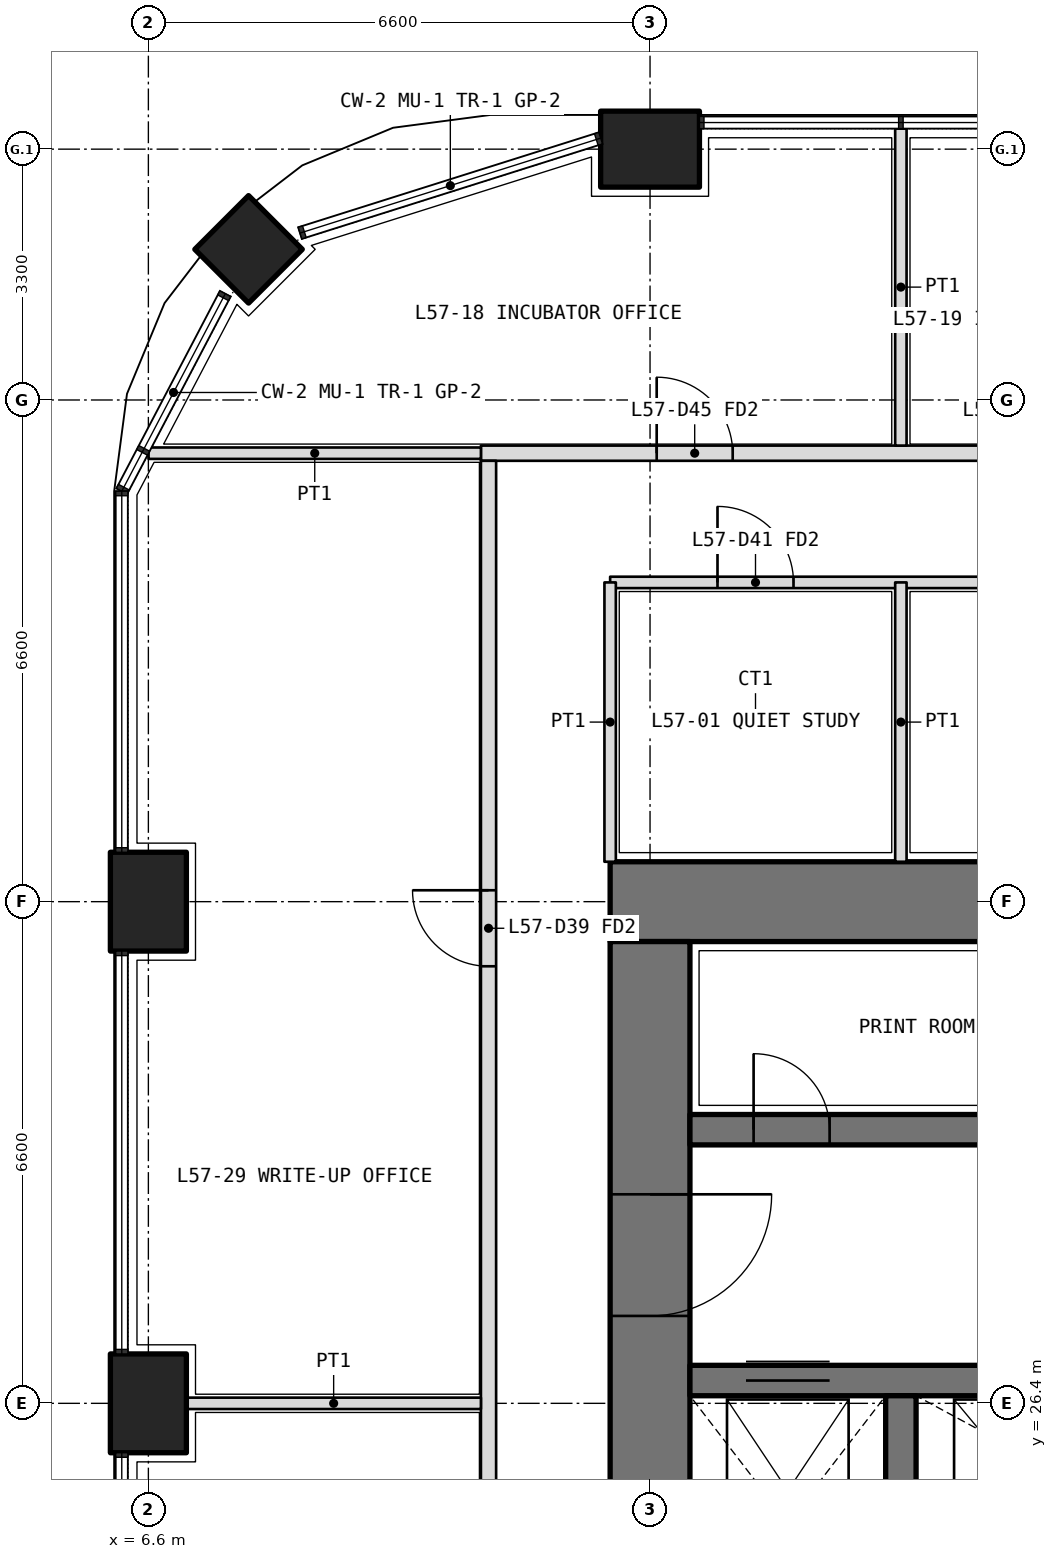
"""IFC4 building model, lengths in metres.
Left out: names, types, materials, properties, quantities, classifications, styles, units other than length and angle.
Written with IfcOpenShell. Run it as: python <this file> out.ifc"""

import sys

from ifc_helpers import new_model, si_unit, direction, frame, frame_2d, origin, origin_2d, place, context, subcontext, project, spatial, rectangle, extrude, element, fill, save


model = new_model("IFC4")
c1 = context("Model", 3, precision=1e-05, world=origin(), true_north=direction((0.0, 1.0)))
c2 = subcontext(c1, "Body", "Model", "MODEL_VIEW")
j1 = project(units=[si_unit("LENGTHUNIT", "METRE"), si_unit("PLANEANGLEUNIT", "RADIAN")], contexts=[c1])
p1 = place(None, origin())
s1 = spatial("IfcSite", under=j1, at=p1, CompositionType="ELEMENT")
p2 = place(p1, origin())
s2 = spatial("IfcBuilding", under=s1, at=p2, CompositionType="ELEMENT")
p3 = place(p2, frame((0.0, 0.0, 250.2)))
s3 = spatial("IfcBuildingStorey", under=s2, at=p3, CompositionType="ELEMENT", Elevation=250.2)
p4 = place(p3, frame((7.918, 41.582, 0.0), z_axis=(0.0, 0.0, 1.0), x_axis=(0.707106781187, 0.707106781187, 0.0)))
e1 = element("IfcColumn", 1, at=p4, inside=s3, PredefinedType="COLUMN", context=c2, shape_type="SweptSolid", body=[
    extrude(rectangle(XDim=1.0, YDim=1.0, at=origin_2d()), origin(), (0.0, 0.0, 1.0), 4.2),
])
for number, where, z_axis, x_axis in (
    (2, (6.6, 26.4, 0.0), (0.0, 0.0, 1.0), (0.0, 1.0, 0.0)),
    (3, (6.6, 33.0, 0.0), (0.0, 0.0, 1.0), (0.0, 1.0, 0.0)),
    (4, (13.2, 42.9, 0.0), (0.0, 0.0, 1.0), (1.0, 0.0, 0.0)),
):
    element("IfcColumn", number, at=place(p3, frame(where, z_axis=z_axis, x_axis=x_axis)), inside=s3, PredefinedType="COLUMN", context=c2, shape_type="SweptSolid", body=[
        extrude(rectangle(XDim=1.3, YDim=1.0, at=origin_2d()), origin(), (0.0, 0.0, 1.0), 4.2),
    ])
p5 = place(p3, frame((40.125, 33.0, 0.0), z_axis=(0.0, 0.0, 1.0), x_axis=(-1.0, 0.0, 0.0)))
e5 = element("IfcWall", 5, at=p5, inside=s3, PredefinedType="SHEAR", context=c2, shape_type="SweptSolid", body=[
    extrude(rectangle(XDim=27.45, YDim=1.05, at=frame_2d((13.725, 0.0))), origin(), (0.0, 0.0, 1.0), 4.2),
])
p6 = place(p3, frame((13.2, 32.475, 0.0), z_axis=(0.0, 0.0, 1.0), x_axis=(0.0, -1.0, 0.0)))
e6 = element("IfcWall", 6, at=p6, inside=s3, PredefinedType="SHEAR", context=c2, shape_type="SweptSolid", body=[
    extrude(rectangle(XDim=18.75, YDim=1.05, at=frame_2d((9.375, 0.0))), origin(), (0.0, 0.0, 1.0), 4.2),
])
p7 = place(p6, frame((14.125, 0.0, 0.0)))
e7 = element("IfcOpeningElement", 7, at=p7, cuts=e6, PredefinedType="OPENING", context=c2, shape_type="SweptSolid", body=[
    extrude(rectangle(XDim=1.6, YDim=2.1, at=frame_2d((0.8, 1.05))), frame((0.0, 0.535, 0.0), z_axis=(0.0, -1.0, 0.0), x_axis=(1.0, 0.0, 0.0)), (0.0, 0.0, 1.0), 1.07),
])
p8 = place(p6, frame((3.325, 0.0, 0.0)))
e8 = element("IfcOpeningElement", 8, at=p8, cuts=e6, PredefinedType="OPENING", context=c2, shape_type="SweptSolid", body=[
    extrude(rectangle(XDim=1.6, YDim=2.1, at=frame_2d((0.8, 1.05))), frame((0.0, 0.535, 0.0), z_axis=(0.0, -1.0, 0.0), x_axis=(1.0, 0.0, 0.0)), (0.0, 0.0, 1.0), 1.07),
])
p9 = place(p3, frame((13.725, 26.7, 0.0), z_axis=(0.0, 0.0, 1.0), x_axis=(1.0, 0.0, 0.0)))
e9 = element("IfcWall", 9, at=p9, inside=s3, PredefinedType="SHEAR", context=c2, shape_type="SweptSolid", body=[
    extrude(rectangle(XDim=25.35, YDim=0.4, at=frame_2d((12.675, 0.0))), origin(), (0.0, 0.0, 1.0), 4.2),
])
p10 = place(p9, frame((23.95, 0.0, 0.0)))
e10 = element("IfcOpeningElement", 10, at=p10, cuts=e9, PredefinedType="OPENING", context=c2, shape_type="SweptSolid", body=[
    extrude(rectangle(XDim=1.2, YDim=2.1, at=frame_2d((0.6, 1.05))), frame((0.0, 0.21, 0.0), z_axis=(0.0, -1.0, 0.0), x_axis=(1.0, 0.0, 0.0)), (0.0, 0.0, 1.0), 0.42),
])
p11 = place(p9, frame((0.738, 0.0, 0.0)))
e11 = element("IfcOpeningElement", 11, at=p11, cuts=e9, PredefinedType="OPENING", context=c2, shape_type="SweptSolid", body=[
    extrude(rectangle(XDim=1.1, YDim=2.1, at=frame_2d((0.55, 1.05))), frame((0.0, 0.21, 0.0), z_axis=(0.0, -1.0, 0.0), x_axis=(1.0, 0.0, 0.0)), (0.0, 0.0, 1.0), 0.42),
])
p12 = place(p9, frame((3.925, 0.0, 0.0)))
e12 = element("IfcOpeningElement", 12, at=p12, cuts=e9, PredefinedType="OPENING", context=c2, shape_type="SweptSolid", body=[
    extrude(rectangle(XDim=1.1, YDim=2.1, at=frame_2d((0.55, 1.05))), frame((0.0, 0.21, 0.0), z_axis=(0.0, -1.0, 0.0), x_axis=(1.0, 0.0, 0.0)), (0.0, 0.0, 1.0), 0.42),
])
p13 = place(p9, frame((7.175, 0.0, 0.0)))
e13 = element("IfcOpeningElement", 13, at=p13, cuts=e9, PredefinedType="OPENING", context=c2, shape_type="SweptSolid", body=[
    extrude(rectangle(XDim=1.1, YDim=2.1, at=frame_2d((0.55, 1.05))), frame((0.0, 0.21, 0.0), z_axis=(0.0, -1.0, 0.0), x_axis=(1.0, 0.0, 0.0)), (0.0, 0.0, 1.0), 0.42),
])
p14 = place(p9, frame((10.425, 0.0, 0.0)))
e14 = element("IfcOpeningElement", 14, at=p14, cuts=e9, PredefinedType="OPENING", context=c2, shape_type="SweptSolid", body=[
    extrude(rectangle(XDim=1.1, YDim=2.1, at=frame_2d((0.55, 1.05))), frame((0.0, 0.21, 0.0), z_axis=(0.0, -1.0, 0.0), x_axis=(1.0, 0.0, 0.0)), (0.0, 0.0, 1.0), 0.42),
])
p15 = place(p9, frame((13.775, 0.0, 0.0)))
e15 = element("IfcOpeningElement", 15, at=p15, cuts=e9, PredefinedType="OPENING", context=c2, shape_type="SweptSolid", body=[
    extrude(rectangle(XDim=1.1, YDim=2.1, at=frame_2d((0.55, 1.05))), frame((0.0, 0.21, 0.0), z_axis=(0.0, -1.0, 0.0), x_axis=(1.0, 0.0, 0.0)), (0.0, 0.0, 1.0), 0.42),
])
p16 = place(p3, frame((13.725, 30.0, 0.0), z_axis=(0.0, 0.0, 1.0), x_axis=(1.0, 0.0, 0.0)))
e16 = element("IfcWall", 16, at=p16, inside=s3, PredefinedType="SHEAR", context=c2, shape_type="SweptSolid", body=[
    extrude(rectangle(XDim=25.35, YDim=0.4, at=frame_2d((12.675, 0.0))), origin(), (0.0, 0.0, 1.0), 4.2),
])
p17 = place(p16, frame((0.837, 0.0, 0.0)))
e17 = element("IfcOpeningElement", 17, at=p17, cuts=e16, PredefinedType="OPENING", context=c2, shape_type="SweptSolid", body=[
    extrude(rectangle(XDim=1.0, YDim=2.1, at=frame_2d((0.5, 1.05))), frame((0.0, 0.21, 0.0), z_axis=(0.0, -1.0, 0.0), x_axis=(1.0, 0.0, 0.0)), (0.0, 0.0, 1.0), 0.42),
])
p18 = place(p16, frame((3.925, 0.0, 0.0)))
e18 = element("IfcOpeningElement", 18, at=p18, cuts=e16, PredefinedType="OPENING", context=c2, shape_type="SweptSolid", body=[
    extrude(rectangle(XDim=1.0, YDim=2.1, at=frame_2d((0.5, 1.05))), frame((0.0, 0.21, 0.0), z_axis=(0.0, -1.0, 0.0), x_axis=(1.0, 0.0, 0.0)), (0.0, 0.0, 1.0), 0.42),
])
p19 = place(p16, frame((7.225, 0.0, 0.0)))
e19 = element("IfcOpeningElement", 19, at=p19, cuts=e16, PredefinedType="OPENING", context=c2, shape_type="SweptSolid", body=[
    extrude(rectangle(XDim=1.0, YDim=2.1, at=frame_2d((0.5, 1.05))), frame((0.0, 0.21, 0.0), z_axis=(0.0, -1.0, 0.0), x_axis=(1.0, 0.0, 0.0)), (0.0, 0.0, 1.0), 0.42),
])
p20 = place(p16, frame((10.525, 0.0, 0.0)))
e20 = element("IfcOpeningElement", 20, at=p20, cuts=e16, PredefinedType="OPENING", context=c2, shape_type="SweptSolid", body=[
    extrude(rectangle(XDim=1.0, YDim=2.1, at=frame_2d((0.5, 1.05))), frame((0.0, 0.21, 0.0), z_axis=(0.0, -1.0, 0.0), x_axis=(1.0, 0.0, 0.0)), (0.0, 0.0, 1.0), 0.42),
])
p21 = place(p16, frame((13.775, 0.0, 0.0)))
e21 = element("IfcOpeningElement", 21, at=p21, cuts=e16, PredefinedType="OPENING", context=c2, shape_type="SweptSolid", body=[
    extrude(rectangle(XDim=1.1, YDim=2.1, at=frame_2d((0.55, 1.05))), frame((0.0, 0.21, 0.0), z_axis=(0.0, -1.0, 0.0), x_axis=(1.0, 0.0, 0.0)), (0.0, 0.0, 1.0), 0.42),
])
p22 = place(p16, frame((17.075, 0.0, 0.0)))
e22 = element("IfcOpeningElement", 22, at=p22, cuts=e16, PredefinedType="OPENING", context=c2, shape_type="SweptSolid", body=[
    extrude(rectangle(XDim=1.1, YDim=2.1, at=frame_2d((0.55, 1.05))), frame((0.0, 0.21, 0.0), z_axis=(0.0, -1.0, 0.0), x_axis=(1.0, 0.0, 0.0)), (0.0, 0.0, 1.0), 0.42),
])
p23 = place(p16, frame((20.375, 0.0, 0.0)))
e23 = element("IfcOpeningElement", 23, at=p23, cuts=e16, PredefinedType="OPENING", context=c2, shape_type="SweptSolid", body=[
    extrude(rectangle(XDim=1.1, YDim=2.1, at=frame_2d((0.55, 1.05))), frame((0.0, 0.21, 0.0), z_axis=(0.0, -1.0, 0.0), x_axis=(1.0, 0.0, 0.0)), (0.0, 0.0, 1.0), 0.42),
])
p24 = place(p16, frame((23.462, 0.0, 0.0)))
e24 = element("IfcOpeningElement", 24, at=p24, cuts=e16, PredefinedType="OPENING", context=c2, shape_type="SweptSolid", body=[
    extrude(rectangle(XDim=1.1, YDim=2.1, at=frame_2d((0.55, 1.05))), frame((0.0, 0.21, 0.0), z_axis=(0.0, -1.0, 0.0), x_axis=(1.0, 0.0, 0.0)), (0.0, 0.0, 1.0), 0.42),
])
p25 = place(p3, frame((16.5, 23.15, 0.0), z_axis=(0.0, 0.0, 1.0), x_axis=(0.0, 1.0, 0.0)))
e25 = element("IfcWall", 25, at=p25, inside=s3, PredefinedType="SHEAR", context=c2, shape_type="SweptSolid", body=[
    extrude(rectangle(XDim=3.35, YDim=0.4, at=frame_2d((1.675, 0.0))), origin(), (0.0, 0.0, 1.0), 4.2),
])
p26 = place(p3, frame((12.675, 37.2, 0.0), z_axis=(0.0, 0.0, 1.0), x_axis=(1.0, 0.0, 0.0)))
e26 = element("IfcWall", 26, at=p26, inside=s3, PredefinedType="PARTITIONING", context=c2, shape_type="SweptSolid", body=[
    extrude(rectangle(XDim=27.45, YDim=0.15, at=frame_2d((13.725, 0.0))), origin(), (0.0, 0.0, 1.0), 3.0),
])
p27 = place(p26, frame((1.413, 0.0, 0.0)))
e27 = element("IfcOpeningElement", 27, at=p27, cuts=e26, PredefinedType="OPENING", context=c2, shape_type="SweptSolid", body=[
    extrude(rectangle(XDim=1.0, YDim=2.1, at=frame_2d((0.5, 1.05))), frame((0.0, 0.085, 0.0), z_axis=(0.0, -1.0, 0.0), x_axis=(1.0, 0.0, 0.0)), (0.0, 0.0, 1.0), 0.17),
])
p28 = place(p26, frame((8.275, 0.0, 0.0)))
e28 = element("IfcOpeningElement", 28, at=p28, cuts=e26, PredefinedType="OPENING", context=c2, shape_type="SweptSolid", body=[
    extrude(rectangle(XDim=1.0, YDim=2.1, at=frame_2d((0.5, 1.05))), frame((0.0, 0.085, 0.0), z_axis=(0.0, -1.0, 0.0), x_axis=(1.0, 0.0, 0.0)), (0.0, 0.0, 1.0), 0.17),
])
p29 = place(p26, frame((14.875, 0.0, 0.0)))
e29 = element("IfcOpeningElement", 29, at=p29, cuts=e26, PredefinedType="OPENING", context=c2, shape_type="SweptSolid", body=[
    extrude(rectangle(XDim=1.0, YDim=2.1, at=frame_2d((0.5, 1.05))), frame((0.0, 0.085, 0.0), z_axis=(0.0, -1.0, 0.0), x_axis=(1.0, 0.0, 0.0)), (0.0, 0.0, 1.0), 0.17),
])
p30 = place(p26, frame((21.738, 0.0, 0.0)))
e30 = element("IfcOpeningElement", 30, at=p30, cuts=e26, PredefinedType="OPENING", context=c2, shape_type="SweptSolid", body=[
    extrude(rectangle(XDim=1.0, YDim=2.1, at=frame_2d((0.5, 1.05))), frame((0.0, 0.085, 0.0), z_axis=(0.0, -1.0, 0.0), x_axis=(1.0, 0.0, 0.0)), (0.0, 0.0, 1.0), 0.17),
])
p31 = place(p3, frame((12.675, 33.525, 0.0), z_axis=(0.0, 0.0, 1.0), x_axis=(0.0, 1.0, 0.0)))
e31 = element("IfcWall", 31, at=p31, inside=s3, PredefinedType="PARTITIONING", context=c2, shape_type="SweptSolid", body=[
    extrude(rectangle(XDim=3.675, YDim=0.15, at=frame_2d((1.837, 0.0))), origin(), (0.0, 0.0, 1.0), 3.0),
])
p32 = place(p3, frame((16.5, 33.525, 0.0), z_axis=(0.0, 0.0, 1.0), x_axis=(0.0, 1.0, 0.0)))
e32 = element("IfcWall", 32, at=p32, inside=s3, PredefinedType="PARTITIONING", context=c2, shape_type="SweptSolid", body=[
    extrude(rectangle(XDim=3.675, YDim=0.15, at=frame_2d((1.837, 0.0))), origin(), (0.0, 0.0, 1.0), 3.9),
])
p33 = place(p3, frame((10.975, 38.9, 0.0), z_axis=(0.0, 0.0, 1.0), x_axis=(1.0, 0.0, 0.0)))
e33 = element("IfcWall", 33, at=p33, inside=s3, PredefinedType="PARTITIONING", context=c2, shape_type="SweptSolid", body=[
    extrude(rectangle(XDim=30.85, YDim=0.2, at=frame_2d((15.425, 0.0))), origin(), (0.0, 0.0, 1.0), 3.0),
])
p34 = place(p33, frame((2.312, 0.0, 0.0)))
e34 = element("IfcOpeningElement", 34, at=p34, cuts=e33, PredefinedType="OPENING", context=c2, shape_type="SweptSolid", body=[
    extrude(rectangle(XDim=1.0, YDim=2.1, at=frame_2d((0.5, 1.05))), frame((0.0, 0.11, 0.0), z_axis=(0.0, -1.0, 0.0), x_axis=(1.0, 0.0, 0.0)), (0.0, 0.0, 1.0), 0.22),
])
p35 = place(p33, frame((6.675, 0.0, 0.0)))
e35 = element("IfcOpeningElement", 35, at=p35, cuts=e33, PredefinedType="OPENING", context=c2, shape_type="SweptSolid", body=[
    extrude(rectangle(XDim=1.0, YDim=2.1, at=frame_2d((0.5, 1.05))), frame((0.0, 0.11, 0.0), z_axis=(0.0, -1.0, 0.0), x_axis=(1.0, 0.0, 0.0)), (0.0, 0.0, 1.0), 0.22),
])
p36 = place(p33, frame((14.925, 0.0, 0.0)))
e36 = element("IfcOpeningElement", 36, at=p36, cuts=e33, PredefinedType="OPENING", context=c2, shape_type="SweptSolid", body=[
    extrude(rectangle(XDim=1.0, YDim=2.1, at=frame_2d((0.5, 1.05))), frame((0.0, 0.11, 0.0), z_axis=(0.0, -1.0, 0.0), x_axis=(1.0, 0.0, 0.0)), (0.0, 0.0, 1.0), 0.22),
])
p37 = place(p33, frame((23.625, 0.0, 0.0)))
e37 = element("IfcOpeningElement", 37, at=p37, cuts=e33, PredefinedType="OPENING", context=c2, shape_type="SweptSolid", body=[
    extrude(rectangle(XDim=1.0, YDim=2.1, at=frame_2d((0.5, 1.05))), frame((0.0, 0.11, 0.0), z_axis=(0.0, -1.0, 0.0), x_axis=(1.0, 0.0, 0.0)), (0.0, 0.0, 1.0), 0.22),
])
p38 = place(p33, frame((26.925, 0.0, 0.0)))
e38 = element("IfcOpeningElement", 38, at=p38, cuts=e33, PredefinedType="OPENING", context=c2, shape_type="SweptSolid", body=[
    extrude(rectangle(XDim=1.0, YDim=2.1, at=frame_2d((0.5, 1.05))), frame((0.0, 0.11, 0.0), z_axis=(0.0, -1.0, 0.0), x_axis=(1.0, 0.0, 0.0)), (0.0, 0.0, 1.0), 0.22),
])
p39 = place(p33, frame((29.087, 0.0, 0.0)))
e39 = element("IfcOpeningElement", 39, at=p39, cuts=e33, PredefinedType="OPENING", context=c2, shape_type="SweptSolid", body=[
    extrude(rectangle(XDim=1.2, YDim=2.1, at=frame_2d((0.6, 1.05))), frame((0.0, 0.11, 0.0), z_axis=(0.0, -1.0, 0.0), x_axis=(1.0, 0.0, 0.0)), (0.0, 0.0, 1.0), 0.22),
])
p40 = place(p3, frame((11.075, 7.4, 0.0), z_axis=(0.0, 0.0, 1.0), x_axis=(0.0, 1.0, 0.0)))
e40 = element("IfcWall", 40, at=p40, inside=s3, PredefinedType="PARTITIONING", context=c2, shape_type="SweptSolid", body=[
    extrude(rectangle(XDim=31.4, YDim=0.2, at=frame_2d((15.7, 0.0))), origin(), (0.0, 0.0, 1.0), 3.0),
])
p41 = place(p40, frame((2.35, 0.0, 0.0)))
e41 = element("IfcOpeningElement", 41, at=p41, cuts=e40, PredefinedType="OPENING", context=c2, shape_type="SweptSolid", body=[
    extrude(rectangle(XDim=1.0, YDim=2.1, at=frame_2d((0.5, 1.05))), frame((0.0, 0.11, 0.0), z_axis=(0.0, -1.0, 0.0), x_axis=(1.0, 0.0, 0.0)), (0.0, 0.0, 1.0), 0.22),
])
p42 = place(p40, frame((6.35, 0.0, 0.0)))
e42 = element("IfcOpeningElement", 42, at=p42, cuts=e40, PredefinedType="OPENING", context=c2, shape_type="SweptSolid", body=[
    extrude(rectangle(XDim=1.0, YDim=2.1, at=frame_2d((0.5, 1.05))), frame((0.0, 0.11, 0.0), z_axis=(0.0, -1.0, 0.0), x_axis=(1.0, 0.0, 0.0)), (0.0, 0.0, 1.0), 0.22),
])
p43 = place(p40, frame((9.45, 0.0, 0.0)))
e43 = element("IfcOpeningElement", 43, at=p43, cuts=e40, PredefinedType="OPENING", context=c2, shape_type="SweptSolid", body=[
    extrude(rectangle(XDim=0.9, YDim=2.1, at=frame_2d((0.45, 1.05))), frame((0.0, 0.11, 0.0), z_axis=(0.0, -1.0, 0.0), x_axis=(1.0, 0.0, 0.0)), (0.0, 0.0, 1.0), 0.22),
])
p44 = place(p40, frame((13.35, 0.0, 0.0)))
e44 = element("IfcOpeningElement", 44, at=p44, cuts=e40, PredefinedType="OPENING", context=c2, shape_type="SweptSolid", body=[
    extrude(rectangle(XDim=0.9, YDim=2.1, at=frame_2d((0.45, 1.05))), frame((0.0, 0.11, 0.0), z_axis=(0.0, -1.0, 0.0), x_axis=(1.0, 0.0, 0.0)), (0.0, 0.0, 1.0), 0.22),
])
p45 = place(p40, frame((16.85, 0.0, 0.0)))
e45 = element("IfcOpeningElement", 45, at=p45, cuts=e40, PredefinedType="OPENING", context=c2, shape_type="SweptSolid", body=[
    extrude(rectangle(XDim=1.0, YDim=2.1, at=frame_2d((0.5, 1.05))), frame((0.0, 0.11, 0.0), z_axis=(0.0, -1.0, 0.0), x_axis=(1.0, 0.0, 0.0)), (0.0, 0.0, 1.0), 0.22),
])
p46 = place(p40, frame((24.75, 0.0, 0.0)))
e46 = element("IfcOpeningElement", 46, at=p46, cuts=e40, PredefinedType="OPENING", context=c2, shape_type="SweptSolid", body=[
    extrude(rectangle(XDim=1.0, YDim=2.1, at=frame_2d((0.5, 1.05))), frame((0.0, 0.11, 0.0), z_axis=(0.0, -1.0, 0.0), x_axis=(1.0, 0.0, 0.0)), (0.0, 0.0, 1.0), 0.22),
])
p47 = place(p3, frame((6.603, 38.9, 0.0), z_axis=(0.0, 0.0, 1.0), x_axis=(1.0, 0.0, 0.0)))
e47 = element("IfcWall", 47, at=p47, inside=s3, PredefinedType="PARTITIONING", context=c2, shape_type="SweptSolid", body=[
    extrude(rectangle(XDim=4.373, YDim=0.15, at=frame_2d((2.186, 0.0))), origin(), (0.0, 0.0, 1.0), 2.7),
])
p48 = place(p3, frame((16.5, 43.17, 0.0), z_axis=(0.0, 0.0, 1.0), x_axis=(0.0, -1.0, 0.0)))
e48 = element("IfcWall", 48, at=p48, inside=s3, PredefinedType="PARTITIONING", context=c2, shape_type="SweptSolid", body=[
    extrude(rectangle(XDim=4.17, YDim=0.15, at=frame_2d((2.085, 0.0))), origin(), (0.0, 0.0, 1.0), 2.7),
])
p49 = place(p3, frame((7.1, 26.4, 0.0), z_axis=(0.0, 0.0, 1.0), x_axis=(1.0, 0.0, 0.0)))
e49 = element("IfcWall", 49, at=p49, inside=s3, PredefinedType="PARTITIONING", context=c2, shape_type="SweptSolid", body=[
    extrude(rectangle(XDim=3.875, YDim=0.15, at=frame_2d((1.938, 0.0))), origin(), (0.0, 0.0, 1.0), 3.0),
])
p50 = place(p27, origin())
e50 = element("IfcDoor", 50, at=p50, inside=s3, OperationType="SINGLE_SWING_LEFT", PredefinedType="DOOR", context=c2, shape_type="SweptSolid", body=[
    extrude(rectangle(XDim=1.0, YDim=2.1, at=frame_2d((0.5, 1.05))), frame((0.0, 0.025, 0.0), z_axis=(0.0, -1.0, 0.0), x_axis=(1.0, 0.0, 0.0)), (0.0, 0.0, 1.0), 0.05),
])
fill(e27, e50)
p51 = place(p34, origin())
e51 = element("IfcDoor", 51, at=p51, inside=s3, OperationType="SINGLE_SWING_LEFT", PredefinedType="DOOR", context=c2, shape_type="SweptSolid", body=[
    extrude(rectangle(XDim=1.0, YDim=2.1, at=frame_2d((0.5, 1.05))), frame((0.0, 0.025, 0.0), z_axis=(0.0, -1.0, 0.0), x_axis=(1.0, 0.0, 0.0)), (0.0, 0.0, 1.0), 0.05),
])
fill(e34, e51)
p52 = place(p46, origin())
e52 = element("IfcDoor", 52, at=p52, inside=s3, OperationType="SINGLE_SWING_RIGHT", PredefinedType="DOOR", context=c2, shape_type="SweptSolid", body=[
    extrude(rectangle(XDim=1.0, YDim=2.1, at=frame_2d((0.5, 1.05))), frame((0.0, 0.025, 0.0), z_axis=(0.0, -1.0, 0.0), x_axis=(1.0, 0.0, 0.0)), (0.0, 0.0, 1.0), 0.05),
])
fill(e46, e52)
p53 = place(p17, origin())
e53 = element("IfcDoor", 53, at=p53, inside=s3, OperationType="SINGLE_SWING_LEFT", PredefinedType="DOOR", context=c2, shape_type="SweptSolid", body=[
    extrude(rectangle(XDim=1.0, YDim=2.1, at=frame_2d((0.5, 1.05))), frame((0.0, 0.025, 0.0), z_axis=(0.0, -1.0, 0.0), x_axis=(1.0, 0.0, 0.0)), (0.0, 0.0, 1.0), 0.05),
])
fill(e17, e53)
p54 = place(p8, origin())
e54 = element("IfcDoor", 54, at=p54, inside=s3, OperationType="DOUBLE_DOOR_DOUBLE_SWING", PredefinedType="DOOR", context=c2, shape_type="SweptSolid", body=[
    extrude(rectangle(XDim=1.6, YDim=2.1, at=frame_2d((0.8, 1.05))), frame((0.0, 0.025, 0.0), z_axis=(0.0, -1.0, 0.0), x_axis=(1.0, 0.0, 0.0)), (0.0, 0.0, 1.0), 0.05),
])
fill(e8, e54)
p55 = place(p11, origin())
e55 = element("IfcDoor", 55, at=p55, inside=s3, OperationType="DOUBLE_DOOR_SLIDING", PredefinedType="DOOR", context=c2, shape_type="SweptSolid", body=[
    extrude(rectangle(XDim=1.1, YDim=2.1, at=frame_2d((0.55, 1.05))), frame((0.0, 0.025, 0.0), z_axis=(0.0, -1.0, 0.0), x_axis=(1.0, 0.0, 0.0)), (0.0, 0.0, 1.0), 0.05),
])
fill(e11, e55)
save(model, sys.argv[1])
